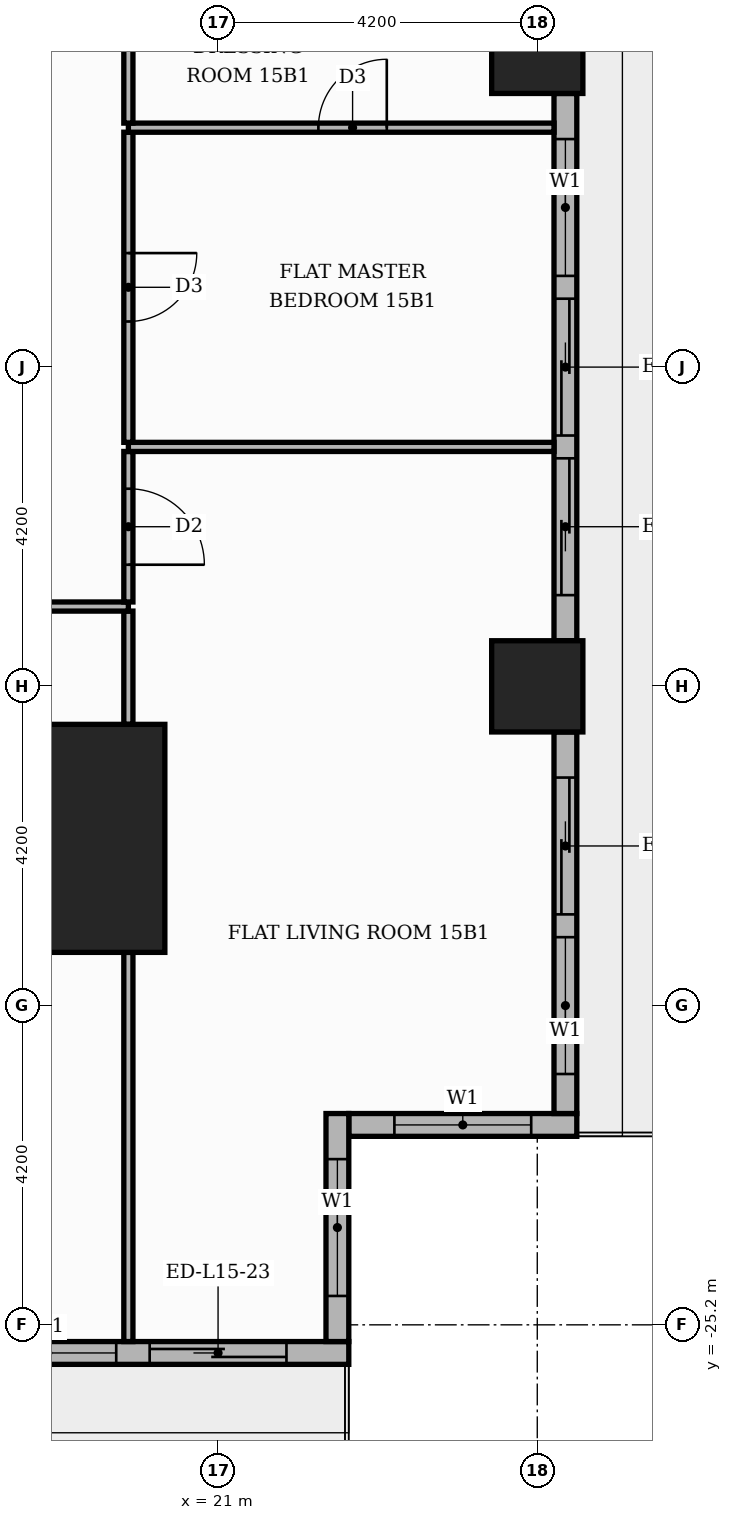
"""IFC4 building model, lengths in metres.
Left out: names, types, materials, properties, quantities, classifications, styles, units other than length and angle.
Written with IfcOpenShell. Run it as: python <this file> out.ifc"""

import sys

from ifc_helpers import new_model, si_unit, direction, frame, frame_2d, origin, origin_2d, place, context, subcontext, project, spatial, rectangle, extrude, element, fill, save


model = new_model("IFC4")
c1 = context("Model", 3, precision=1e-05, world=origin(), true_north=direction((0.0, 1.0)))
c2 = subcontext(c1, "Body", "Model", "MODEL_VIEW")
j1 = project(units=[si_unit("LENGTHUNIT", "METRE"), si_unit("PLANEANGLEUNIT", "RADIAN")], contexts=[c1])
p1 = place(None, origin())
s1 = spatial("IfcSite", under=j1, at=p1, CompositionType="ELEMENT")
p2 = place(p1, origin())
s2 = spatial("IfcBuilding", under=s1, at=p2, CompositionType="ELEMENT")
p3 = place(p2, frame((0.0, 0.0, 66.0)))
s3 = spatial("IfcBuildingStorey", under=s2, at=p3, CompositionType="ELEMENT", Elevation=66.0)
p4 = place(p3, frame((18.8, -18.8, 0.0), z_axis=(0.0, 0.0, 1.0), x_axis=(1.0, 0.0, 0.0)))
e1 = element("IfcColumn", 1, at=p4, inside=s3, PredefinedType="COLUMN", context=c2, shape_type="SweptSolid", body=[
    extrude(rectangle(XDim=3.0, YDim=3.0, at=origin_2d()), origin(), (0.0, 0.0, 1.0), 3.9),
])
for number, where, z_axis, x_axis in (
    (2, (25.2, -8.4, 0.0), (0.0, 0.0, 1.0), (1.0, 0.0, 0.0)),
    (3, (25.2, -16.8, 0.0), (0.0, 0.0, 1.0), (1.0, 0.0, 0.0)),
):
    element("IfcColumn", number, at=place(p3, frame(where, z_axis=z_axis, x_axis=x_axis)), inside=s3, PredefinedType="COLUMN", context=c2, shape_type="SweptSolid", body=[
        extrude(rectangle(XDim=1.2, YDim=1.2, at=origin_2d()), origin(), (0.0, 0.0, 1.0), 3.9),
    ])
p5 = place(p3, frame((22.72, -22.57, 0.0), z_axis=(0.0, 0.0, 1.0), x_axis=(1.0, 0.0, 0.0)))
e4 = element("IfcWall", 4, at=p5, inside=s3, PredefinedType="STANDARD", context=c2, shape_type="SweptSolid", body=[
    extrude(rectangle(XDim=3.0, YDim=0.3, at=frame_2d((1.5, 0.0))), origin(), (0.0, 0.0, 1.0), 3.48),
])
p6 = place(p5, frame((0.6, 0.0, 0.9)))
e5 = element("IfcOpeningElement", 5, at=p6, cuts=e4, PredefinedType="OPENING", context=c2, shape_type="SweptSolid", body=[
    extrude(rectangle(XDim=1.8, YDim=2.1, at=frame_2d((0.9, 1.05))), frame((0.0, 0.16, 0.0), z_axis=(0.0, -1.0, 0.0), x_axis=(1.0, 0.0, 0.0)), (0.0, 0.0, 1.0), 0.32),
])
p7 = place(p3, frame((25.57, -22.42, 0.0), z_axis=(0.0, 0.0, 1.0), x_axis=(0.0, 1.0, 0.0)))
e6 = element("IfcWall", 6, at=p7, inside=s3, PredefinedType="STANDARD", context=c2, shape_type="SweptSolid", body=[
    extrude(rectangle(XDim=5.02, YDim=0.3, at=frame_2d((2.51, 0.0))), origin(), (0.0, 0.0, 1.0), 3.48),
])
p8 = place(p7, frame((0.52, 0.0, 0.9)))
e7 = element("IfcOpeningElement", 7, at=p8, cuts=e6, PredefinedType="OPENING", context=c2, shape_type="SweptSolid", body=[
    extrude(rectangle(XDim=1.8, YDim=2.1, at=frame_2d((0.9, 1.05))), frame((0.0, 0.16, 0.0), z_axis=(0.0, -1.0, 0.0), x_axis=(1.0, 0.0, 0.0)), (0.0, 0.0, 1.0), 0.32),
])
p9 = place(p7, frame((2.62, 0.0, 0.0)))
e8 = element("IfcOpeningElement", 8, at=p9, cuts=e6, PredefinedType="OPENING", context=c2, shape_type="SweptSolid", body=[
    extrude(rectangle(XDim=1.8, YDim=2.4, at=frame_2d((0.9, 1.2))), frame((0.0, 0.16, 0.0), z_axis=(0.0, -1.0, 0.0), x_axis=(1.0, 0.0, 0.0)), (0.0, 0.0, 1.0), 0.32),
])
p10 = place(p3, frame((25.57, -16.2, 0.0), z_axis=(0.0, 0.0, 1.0), x_axis=(0.0, 1.0, 0.0)))
e9 = element("IfcWall", 9, at=p10, inside=s3, PredefinedType="STANDARD", context=c2, shape_type="SweptSolid", body=[
    extrude(rectangle(XDim=7.2, YDim=0.3, at=frame_2d((3.6, 0.0))), origin(), (0.0, 0.0, 1.0), 3.48),
])
p11 = place(p10, frame((0.6, 0.0, 0.0)))
e10 = element("IfcOpeningElement", 10, at=p11, cuts=e9, PredefinedType="OPENING", context=c2, shape_type="SweptSolid", body=[
    extrude(rectangle(XDim=1.8, YDim=2.4, at=frame_2d((0.9, 1.2))), frame((0.0, 0.16, 0.0), z_axis=(0.0, -1.0, 0.0), x_axis=(1.0, 0.0, 0.0)), (0.0, 0.0, 1.0), 0.32),
])
p12 = place(p10, frame((2.7, 0.0, 0.0)))
e11 = element("IfcOpeningElement", 11, at=p12, cuts=e9, PredefinedType="OPENING", context=c2, shape_type="SweptSolid", body=[
    extrude(rectangle(XDim=1.8, YDim=2.4, at=frame_2d((0.9, 1.2))), frame((0.0, 0.16, 0.0), z_axis=(0.0, -1.0, 0.0), x_axis=(1.0, 0.0, 0.0)), (0.0, 0.0, 1.0), 0.32),
])
p13 = place(p10, frame((4.8, 0.0, 0.9)))
e12 = element("IfcOpeningElement", 12, at=p13, cuts=e9, PredefinedType="OPENING", context=c2, shape_type="SweptSolid", body=[
    extrude(rectangle(XDim=1.8, YDim=2.1, at=frame_2d((0.9, 1.05))), frame((0.0, 0.16, 0.0), z_axis=(0.0, -1.0, 0.0), x_axis=(1.0, 0.0, 0.0)), (0.0, 0.0, 1.0), 0.32),
])
p14 = place(p3, frame((17.4, -25.57, 0.0), z_axis=(0.0, 0.0, 1.0), x_axis=(1.0, 0.0, 0.0)))
e13 = element("IfcWall", 13, at=p14, inside=s3, PredefinedType="STANDARD", context=c2, shape_type="SweptSolid", body=[
    extrude(rectangle(XDim=5.32, YDim=0.3, at=frame_2d((2.66, 0.0))), origin(), (0.0, 0.0, 1.0), 3.48),
])
p15 = place(p14, frame((2.7, 0.0, 0.0)))
e14 = element("IfcOpeningElement", 14, at=p15, cuts=e13, PredefinedType="OPENING", context=c2, shape_type="SweptSolid", body=[
    extrude(rectangle(XDim=1.8, YDim=2.4, at=frame_2d((0.9, 1.2))), frame((0.0, 0.16, 0.0), z_axis=(0.0, -1.0, 0.0), x_axis=(1.0, 0.0, 0.0)), (0.0, 0.0, 1.0), 0.32),
])
p16 = place(p14, frame((0.46, 0.0, 0.9)))
e15 = element("IfcOpeningElement", 15, at=p16, cuts=e13, PredefinedType="OPENING", context=c2, shape_type="SweptSolid", body=[
    extrude(rectangle(XDim=1.8, YDim=2.1, at=frame_2d((0.9, 1.05))), frame((0.0, 0.16, 0.0), z_axis=(0.0, -1.0, 0.0), x_axis=(1.0, 0.0, 0.0)), (0.0, 0.0, 1.0), 0.32),
])
p17 = place(p3, frame((22.57, -25.42, 0.0), z_axis=(0.0, 0.0, 1.0), x_axis=(0.0, 1.0, 0.0)))
e16 = element("IfcWall", 16, at=p17, inside=s3, PredefinedType="STANDARD", context=c2, shape_type="SweptSolid", body=[
    extrude(rectangle(XDim=3.0, YDim=0.3, at=frame_2d((1.5, 0.0))), origin(), (0.0, 0.0, 1.0), 3.48),
])
p18 = place(p17, frame((0.6, 0.0, 0.9)))
e17 = element("IfcOpeningElement", 17, at=p18, cuts=e16, PredefinedType="OPENING", context=c2, shape_type="SweptSolid", body=[
    extrude(rectangle(XDim=1.8, YDim=2.1, at=frame_2d((0.9, 1.05))), frame((0.0, 0.16, 0.0), z_axis=(0.0, -1.0, 0.0), x_axis=(1.0, 0.0, 0.0)), (0.0, 0.0, 1.0), 0.32),
])
p19 = place(p3, frame((19.82, -25.42, 0.0), z_axis=(0.0, 0.0, 1.0), x_axis=(0.0, 1.0, 0.0)))
e18 = element("IfcWall", 18, at=p19, inside=s3, PredefinedType="PARTITIONING", context=c2, shape_type="SweptSolid", body=[
    extrude(rectangle(XDim=5.12, YDim=0.12, at=frame_2d((2.56, 0.0))), origin(), (0.0, 0.0, 1.0), 3.48),
])
p20 = place(p3, frame((19.82, -17.3, 0.0), z_axis=(0.0, 0.0, 1.0), x_axis=(0.0, 1.0, 0.0)))
e19 = element("IfcWall", 19, at=p20, inside=s3, PredefinedType="PARTITIONING", context=c2, shape_type="SweptSolid", body=[
    extrude(rectangle(XDim=1.49, YDim=0.12, at=frame_2d((0.745, 0.0))), origin(), (0.0, 0.0, 1.0), 3.48),
])
p21 = place(p3, frame((13.75, -15.75, 0.0), z_axis=(0.0, 0.0, 1.0), x_axis=(1.0, 0.0, 0.0)))
e20 = element("IfcWall", 20, at=p21, inside=s3, PredefinedType="PARTITIONING", context=c2, shape_type="SweptSolid", body=[
    extrude(rectangle(XDim=6.07, YDim=0.12, at=frame_2d((3.035, 0.0))), origin(), (0.0, 0.0, 1.0), 3.48),
])
p22 = place(p21, frame((2.485, 0.0, 0.0)))
e21 = element("IfcOpeningElement", 21, at=p22, cuts=e20, PredefinedType="OPENING", context=c2, shape_type="SweptSolid", body=[
    extrude(rectangle(XDim=1.0, YDim=2.1, at=frame_2d((0.5, 1.05))), frame((0.0, 0.07, 0.0), z_axis=(0.0, -1.0, 0.0), x_axis=(1.0, 0.0, 0.0)), (0.0, 0.0, 1.0), 0.14),
])
p23 = place(p3, frame((19.82, -15.69, 0.0), z_axis=(0.0, 0.0, 1.0), x_axis=(0.0, 1.0, 0.0)))
e22 = element("IfcWall", 22, at=p23, inside=s3, PredefinedType="PARTITIONING", context=c2, shape_type="SweptSolid", body=[
    extrude(rectangle(XDim=1.98, YDim=0.12, at=frame_2d((0.99, 0.0))), origin(), (0.0, 0.0, 1.0), 3.48),
])
p24 = place(p23, frame((0.49, 0.0, 0.0)))
e23 = element("IfcOpeningElement", 23, at=p24, cuts=e22, PredefinedType="OPENING", context=c2, shape_type="SweptSolid", body=[
    extrude(rectangle(XDim=1.0, YDim=2.1, at=frame_2d((0.5, 1.05))), frame((0.0, 0.07, 0.0), z_axis=(0.0, -1.0, 0.0), x_axis=(1.0, 0.0, 0.0)), (0.0, 0.0, 1.0), 0.14),
])
p25 = place(p3, frame((19.82, -13.65, 0.0), z_axis=(0.0, 0.0, 1.0), x_axis=(1.0, 0.0, 0.0)))
e24 = element("IfcWall", 24, at=p25, inside=s3, PredefinedType="PARTITIONING", context=c2, shape_type="SweptSolid", body=[
    extrude(rectangle(XDim=5.6, YDim=0.12, at=frame_2d((2.8, 0.0))), origin(), (0.0, 0.0, 1.0), 3.48),
])
p26 = place(p3, frame((19.82, -13.59, 0.0), z_axis=(0.0, 0.0, 1.0), x_axis=(0.0, 1.0, 0.0)))
e25 = element("IfcWall", 25, at=p26, inside=s3, PredefinedType="PARTITIONING", context=c2, shape_type="SweptSolid", body=[
    extrude(rectangle(XDim=4.08, YDim=0.12, at=frame_2d((2.04, 0.0))), origin(), (0.0, 0.0, 1.0), 3.48),
])
p27 = place(p26, frame((1.59, 0.0, 0.0)))
e26 = element("IfcOpeningElement", 26, at=p27, cuts=e25, PredefinedType="OPENING", context=c2, shape_type="SweptSolid", body=[
    extrude(rectangle(XDim=0.9, YDim=2.1, at=frame_2d((0.45, 1.05))), frame((0.0, 0.07, 0.0), z_axis=(0.0, -1.0, 0.0), x_axis=(1.0, 0.0, 0.0)), (0.0, 0.0, 1.0), 0.14),
])
p28 = place(p3, frame((19.82, -9.45, 0.0), z_axis=(0.0, 0.0, 1.0), x_axis=(1.0, 0.0, 0.0)))
e27 = element("IfcWall", 27, at=p28, inside=s3, PredefinedType="PARTITIONING", context=c2, shape_type="SweptSolid", body=[
    extrude(rectangle(XDim=5.6, YDim=0.12, at=frame_2d((2.8, 0.0))), origin(), (0.0, 0.0, 1.0), 3.48),
])
p29 = place(p28, frame((2.5, 0.0, 0.0)))
e28 = element("IfcOpeningElement", 28, at=p29, cuts=e27, PredefinedType="OPENING", context=c2, shape_type="SweptSolid", body=[
    extrude(rectangle(XDim=0.9, YDim=2.1, at=frame_2d((0.45, 1.05))), frame((0.0, 0.07, 0.0), z_axis=(0.0, -1.0, 0.0), x_axis=(1.0, 0.0, 0.0)), (0.0, 0.0, 1.0), 0.14),
])
p30 = place(p3, frame((19.82, -9.39, 0.0), z_axis=(0.0, 0.0, 1.0), x_axis=(0.0, 1.0, 0.0)))
e29 = element("IfcWall", 29, at=p30, inside=s3, PredefinedType="PARTITIONING", context=c2, shape_type="SweptSolid", body=[
    extrude(rectangle(XDim=1.98, YDim=0.12, at=frame_2d((0.99, 0.0))), origin(), (0.0, 0.0, 1.0), 3.48),
])
p31 = place(p6, origin())
e30 = element("IfcWindow", 30, at=p31, inside=s3, PartitioningType="SINGLE_PANEL", PredefinedType="WINDOW", context=c2, shape_type="SweptSolid", body=[
    extrude(rectangle(XDim=1.8, YDim=2.1, at=frame_2d((0.9, 1.05))), frame((0.0, 0.03, 0.0), z_axis=(0.0, -1.0, 0.0), x_axis=(1.0, 0.0, 0.0)), (0.0, 0.0, 1.0), 0.06),
])
fill(e5, e30)
p32 = place(p8, origin())
e31 = element("IfcWindow", 31, at=p32, inside=s3, PartitioningType="SINGLE_PANEL", PredefinedType="WINDOW", context=c2, shape_type="SweptSolid", body=[
    extrude(rectangle(XDim=1.8, YDim=2.1, at=frame_2d((0.9, 1.05))), frame((0.0, 0.03, 0.0), z_axis=(0.0, -1.0, 0.0), x_axis=(1.0, 0.0, 0.0)), (0.0, 0.0, 1.0), 0.06),
])
fill(e7, e31)
p33 = place(p9, origin())
e32 = element("IfcDoor", 32, at=p33, inside=s3, OperationType="SLIDING_TO_RIGHT", PredefinedType="DOOR", context=c2, shape_type="SweptSolid", body=[
    extrude(rectangle(XDim=1.8, YDim=2.4, at=frame_2d((0.9, 1.2))), frame((0.0, 0.025, 0.0), z_axis=(0.0, -1.0, 0.0), x_axis=(1.0, 0.0, 0.0)), (0.0, 0.0, 1.0), 0.05),
])
fill(e8, e32)
p34 = place(p11, origin())
e33 = element("IfcDoor", 33, at=p34, inside=s3, OperationType="SLIDING_TO_LEFT", PredefinedType="DOOR", context=c2, shape_type="SweptSolid", body=[
    extrude(rectangle(XDim=1.8, YDim=2.4, at=frame_2d((0.9, 1.2))), frame((0.0, 0.025, 0.0), z_axis=(0.0, -1.0, 0.0), x_axis=(1.0, 0.0, 0.0)), (0.0, 0.0, 1.0), 0.05),
])
fill(e10, e33)
p35 = place(p12, origin())
e34 = element("IfcDoor", 34, at=p35, inside=s3, OperationType="SLIDING_TO_RIGHT", PredefinedType="DOOR", context=c2, shape_type="SweptSolid", body=[
    extrude(rectangle(XDim=1.8, YDim=2.4, at=frame_2d((0.9, 1.2))), frame((0.0, 0.025, 0.0), z_axis=(0.0, -1.0, 0.0), x_axis=(1.0, 0.0, 0.0)), (0.0, 0.0, 1.0), 0.05),
])
fill(e11, e34)
p36 = place(p13, origin())
e35 = element("IfcWindow", 35, at=p36, inside=s3, PartitioningType="SINGLE_PANEL", PredefinedType="WINDOW", context=c2, shape_type="SweptSolid", body=[
    extrude(rectangle(XDim=1.8, YDim=2.1, at=frame_2d((0.9, 1.05))), frame((0.0, 0.03, 0.0), z_axis=(0.0, -1.0, 0.0), x_axis=(1.0, 0.0, 0.0)), (0.0, 0.0, 1.0), 0.06),
])
fill(e12, e35)
p37 = place(p15, origin())
e36 = element("IfcDoor", 36, at=p37, inside=s3, OperationType="SLIDING_TO_LEFT", PredefinedType="DOOR", context=c2, shape_type="SweptSolid", body=[
    extrude(rectangle(XDim=1.8, YDim=2.4, at=frame_2d((0.9, 1.2))), frame((0.0, 0.025, 0.0), z_axis=(0.0, -1.0, 0.0), x_axis=(1.0, 0.0, 0.0)), (0.0, 0.0, 1.0), 0.05),
])
fill(e14, e36)
p38 = place(p16, origin())
e37 = element("IfcWindow", 37, at=p38, inside=s3, PartitioningType="SINGLE_PANEL", PredefinedType="WINDOW", context=c2, shape_type="SweptSolid", body=[
    extrude(rectangle(XDim=1.8, YDim=2.1, at=frame_2d((0.9, 1.05))), frame((0.0, 0.03, 0.0), z_axis=(0.0, -1.0, 0.0), x_axis=(1.0, 0.0, 0.0)), (0.0, 0.0, 1.0), 0.06),
])
fill(e15, e37)
p39 = place(p18, origin())
e38 = element("IfcWindow", 38, at=p39, inside=s3, PartitioningType="SINGLE_PANEL", PredefinedType="WINDOW", context=c2, shape_type="SweptSolid", body=[
    extrude(rectangle(XDim=1.8, YDim=2.1, at=frame_2d((0.9, 1.05))), frame((0.0, 0.03, 0.0), z_axis=(0.0, -1.0, 0.0), x_axis=(1.0, 0.0, 0.0)), (0.0, 0.0, 1.0), 0.06),
])
fill(e17, e38)
p40 = place(p24, frame((1.0, 0.0, 0.0), z_axis=(0.0, 0.0, 1.0), x_axis=(-1.0, 0.0, 0.0)))
e39 = element("IfcDoor", 39, at=p40, inside=s3, OperationType="SINGLE_SWING_LEFT", PredefinedType="DOOR", context=c2, shape_type="SweptSolid", body=[
    extrude(rectangle(XDim=1.0, YDim=2.1, at=frame_2d((0.5, 1.05))), frame((0.0, 0.025, 0.0), z_axis=(0.0, -1.0, 0.0), x_axis=(1.0, 0.0, 0.0)), (0.0, 0.0, 1.0), 0.05),
])
fill(e23, e39)
p41 = place(p27, frame((0.9, 0.0, 0.0), z_axis=(0.0, 0.0, 1.0), x_axis=(-1.0, 0.0, 0.0)))
e40 = element("IfcDoor", 40, at=p41, inside=s3, OperationType="SINGLE_SWING_RIGHT", PredefinedType="DOOR", context=c2, shape_type="SweptSolid", body=[
    extrude(rectangle(XDim=0.9, YDim=2.1, at=frame_2d((0.45, 1.05))), frame((0.0, 0.025, 0.0), z_axis=(0.0, -1.0, 0.0), x_axis=(1.0, 0.0, 0.0)), (0.0, 0.0, 1.0), 0.05),
])
fill(e26, e40)
p42 = place(p29, origin())
e41 = element("IfcDoor", 41, at=p42, inside=s3, OperationType="SINGLE_SWING_RIGHT", PredefinedType="DOOR", context=c2, shape_type="SweptSolid", body=[
    extrude(rectangle(XDim=0.9, YDim=2.1, at=frame_2d((0.45, 1.05))), frame((0.0, 0.025, 0.0), z_axis=(0.0, -1.0, 0.0), x_axis=(1.0, 0.0, 0.0)), (0.0, 0.0, 1.0), 0.05),
])
fill(e28, e41)
save(model, sys.argv[1])
